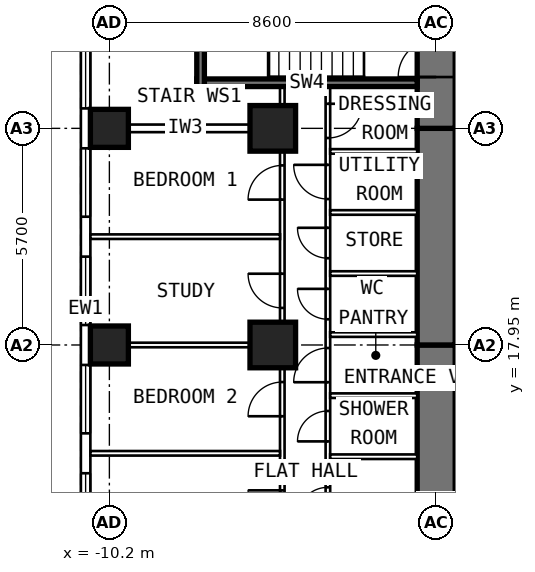
"""IFC4 building model, lengths in metres.
Left out: names, types, materials, properties, quantities, classifications, styles, units other than length and angle.
Written with IfcOpenShell. Run it as: python <this file> out.ifc"""

import sys

from ifc_helpers import new_model, si_unit, direction, frame, frame_2d, origin, origin_2d, place, context, subcontext, project, spatial, rectangle, extrude, element, fill, save


model = new_model("IFC4")
c1 = context("Model", 3, precision=1e-05, world=origin(), true_north=direction((0.0, 1.0)))
c2 = subcontext(c1, "Body", "Model", "MODEL_VIEW")
j1 = project(units=[si_unit("LENGTHUNIT", "METRE"), si_unit("PLANEANGLEUNIT", "RADIAN")], contexts=[c1])
p1 = place(None, origin())
s1 = spatial("IfcSite", under=j1, at=p1, CompositionType="ELEMENT")
p2 = place(p1, origin())
s2 = spatial("IfcBuilding", under=s1, at=p2, CompositionType="ELEMENT")
p3 = place(p2, frame((0.0, 0.0, 46.6)))
s3 = spatial("IfcBuildingStorey", under=s2, at=p3, CompositionType="ELEMENT", Elevation=46.6)
for number, where, z_axis, x_axis in (
    (1, (-10.2, 17.95, 0.0), (0.0, 0.0, 1.0), (0.0, 1.0, 0.0)),
    (2, (-10.2, 23.65, 0.0), (0.0, 0.0, 1.0), (0.0, 1.0, 0.0)),
):
    element("IfcColumn", number, at=place(p3, frame(where, z_axis=z_axis, x_axis=x_axis)), inside=s3, PredefinedType="COLUMN", context=c2, shape_type="SweptSolid", body=[
        extrude(rectangle(XDim=1.0, YDim=1.0, at=origin_2d()), origin(), (0.0, 0.0, 1.0), 3.6),
    ])
for number, where, z_axis, x_axis in (
    (3, (-5.9, 17.95, 0.0), (0.0, 0.0, 1.0), (0.0, 1.0, 0.0)),
    (4, (-5.9, 23.65, 0.0), (0.0, 0.0, 1.0), (0.0, 1.0, 0.0)),
):
    element("IfcColumn", number, at=place(p3, frame(where, z_axis=z_axis, x_axis=x_axis)), inside=s3, PredefinedType="COLUMN", context=c2, shape_type="SweptSolid", body=[
        extrude(rectangle(XDim=1.2, YDim=1.2, at=origin_2d()), origin(), (0.0, 0.0, 1.0), 3.6),
    ])
p4 = place(p3, frame((-1.6, 9.6, 0.0), z_axis=(0.0, 0.0, 1.0), x_axis=(0.0, 1.0, 0.0)))
e5 = element("IfcWall", 5, at=p4, inside=s3, PredefinedType="SHEAR", context=c2, shape_type="SweptSolid", body=[
    extrude(rectangle(XDim=8.35, YDim=1.0, at=frame_2d((4.175, 0.0))), origin(), (0.0, 0.0, 1.0), 3.6),
])
p5 = place(p4, frame((1.3, 0.0, 0.0)))
e6 = element("IfcOpeningElement", 6, at=p5, cuts=e5, PredefinedType="OPENING", context=c2, shape_type="SweptSolid", body=[
    extrude(rectangle(XDim=1.0, YDim=2.1, at=frame_2d((0.5, 1.05))), frame((0.0, 0.512, 0.0), z_axis=(0.0, -1.0, 0.0), x_axis=(1.0, 0.0, 0.0)), (0.0, 0.0, 1.0), 1.024),
])
p6 = place(p3, frame((-1.6, 17.95, 0.0), z_axis=(0.0, 0.0, 1.0), x_axis=(0.0, 1.0, 0.0)))
e7 = element("IfcWall", 7, at=p6, inside=s3, PredefinedType="SHEAR", context=c2, shape_type="SweptSolid", body=[
    extrude(rectangle(XDim=5.7, YDim=1.0, at=frame_2d((2.85, 0.0))), origin(), (0.0, 0.0, 1.0), 3.6),
])
p7 = place(p3, frame((-1.6, 23.65, 0.0), z_axis=(0.0, 0.0, 1.0), x_axis=(0.0, 1.0, 0.0)))
e8 = element("IfcWall", 8, at=p7, inside=s3, PredefinedType="SHEAR", context=c2, shape_type="SweptSolid", body=[
    extrude(rectangle(XDim=10.745, YDim=1.0, at=frame_2d((5.373, 0.0))), origin(), (0.0, 0.0, 1.0), 3.6),
])
p8 = place(p7, frame((6.1, 0.0, 0.0)))
e9 = element("IfcOpeningElement", 9, at=p8, cuts=e8, PredefinedType="OPENING", context=c2, shape_type="SweptSolid", body=[
    extrude(rectangle(XDim=1.0, YDim=2.1, at=frame_2d((0.5, 1.05))), frame((0.0, 0.512, 0.0), z_axis=(0.0, -1.0, 0.0), x_axis=(1.0, 0.0, 0.0)), (0.0, 0.0, 1.0), 1.024),
])
p9 = place(p7, frame((1.35, 0.0, 0.0)))
e10 = element("IfcOpeningElement", 10, at=p9, cuts=e8, PredefinedType="OPENING", context=c2, shape_type="SweptSolid", body=[
    extrude(rectangle(XDim=1.0, YDim=2.1, at=frame_2d((0.5, 1.05))), frame((0.0, 0.512, 0.0), z_axis=(0.0, -1.0, 0.0), x_axis=(1.0, 0.0, 0.0)), (0.0, 0.0, 1.0), 1.024),
])
p10 = place(p3, frame((-10.825, 6.148, 0.0), z_axis=(0.0, 0.0, 1.0), x_axis=(0.0, 1.0, 0.0)))
e11 = element("IfcWall", 11, at=p10, inside=s3, PredefinedType="SOLIDWALL", context=c2, shape_type="SweptSolid", body=[
    extrude(rectangle(XDim=25.487, YDim=0.25, at=frame_2d((12.744, 0.0))), origin(), (0.0, 0.0, 1.0), 3.35),
])
p11 = place(p10, frame((0.927, 0.0, 0.8)))
e12 = element("IfcOpeningElement", 12, at=p11, cuts=e11, PredefinedType="OPENING", context=c2, shape_type="SweptSolid", body=[
    extrude(rectangle(XDim=1.8, YDim=1.8, at=frame_2d((0.9, 0.9))), frame((0.0, 0.137, 0.0), z_axis=(0.0, -1.0, 0.0), x_axis=(1.0, 0.0, 0.0)), (0.0, 0.0, 1.0), 0.274),
])
p12 = place(p10, frame((3.777, 0.0, 0.8)))
e13 = element("IfcOpeningElement", 13, at=p12, cuts=e11, PredefinedType="OPENING", context=c2, shape_type="SweptSolid", body=[
    extrude(rectangle(XDim=1.8, YDim=1.8, at=frame_2d((0.9, 0.9))), frame((0.0, 0.137, 0.0), z_axis=(0.0, -1.0, 0.0), x_axis=(1.0, 0.0, 0.0)), (0.0, 0.0, 1.0), 0.274),
])
p13 = place(p10, frame((6.627, 0.0, 0.8)))
e14 = element("IfcOpeningElement", 14, at=p13, cuts=e11, PredefinedType="OPENING", context=c2, shape_type="SweptSolid", body=[
    extrude(rectangle(XDim=1.8, YDim=1.8, at=frame_2d((0.9, 0.9))), frame((0.0, 0.137, 0.0), z_axis=(0.0, -1.0, 0.0), x_axis=(1.0, 0.0, 0.0)), (0.0, 0.0, 1.0), 0.274),
])
p14 = place(p10, frame((9.477, 0.0, 0.8)))
e15 = element("IfcOpeningElement", 15, at=p14, cuts=e11, PredefinedType="OPENING", context=c2, shape_type="SweptSolid", body=[
    extrude(rectangle(XDim=1.8, YDim=1.8, at=frame_2d((0.9, 0.9))), frame((0.0, 0.137, 0.0), z_axis=(0.0, -1.0, 0.0), x_axis=(1.0, 0.0, 0.0)), (0.0, 0.0, 1.0), 0.274),
])
p15 = place(p10, frame((12.327, 0.0, 0.8)))
e16 = element("IfcOpeningElement", 16, at=p15, cuts=e11, PredefinedType="OPENING", context=c2, shape_type="SweptSolid", body=[
    extrude(rectangle(XDim=1.8, YDim=1.8, at=frame_2d((0.9, 0.9))), frame((0.0, 0.137, 0.0), z_axis=(0.0, -1.0, 0.0), x_axis=(1.0, 0.0, 0.0)), (0.0, 0.0, 1.0), 0.274),
])
p16 = place(p10, frame((15.177, 0.0, 0.8)))
e17 = element("IfcOpeningElement", 17, at=p16, cuts=e11, PredefinedType="OPENING", context=c2, shape_type="SweptSolid", body=[
    extrude(rectangle(XDim=1.8, YDim=1.8, at=frame_2d((0.9, 0.9))), frame((0.0, 0.137, 0.0), z_axis=(0.0, -1.0, 0.0), x_axis=(1.0, 0.0, 0.0)), (0.0, 0.0, 1.0), 0.274),
])
p17 = place(p10, frame((18.027, 0.0, 0.8)))
e18 = element("IfcOpeningElement", 18, at=p17, cuts=e11, PredefinedType="OPENING", context=c2, shape_type="SweptSolid", body=[
    extrude(rectangle(XDim=1.8, YDim=1.8, at=frame_2d((0.9, 0.9))), frame((0.0, 0.137, 0.0), z_axis=(0.0, -1.0, 0.0), x_axis=(1.0, 0.0, 0.0)), (0.0, 0.0, 1.0), 0.274),
])
p18 = place(p10, frame((20.877, 0.0, 0.8)))
e19 = element("IfcOpeningElement", 19, at=p18, cuts=e11, PredefinedType="OPENING", context=c2, shape_type="SweptSolid", body=[
    extrude(rectangle(XDim=1.8, YDim=1.8, at=frame_2d((0.9, 0.9))), frame((0.0, 0.137, 0.0), z_axis=(0.0, -1.0, 0.0), x_axis=(1.0, 0.0, 0.0)), (0.0, 0.0, 1.0), 0.274),
])
p19 = place(p3, frame((-4.45, 10.1, 0.0), z_axis=(0.0, 0.0, 1.0), x_axis=(0.0, 1.0, 0.0)))
e20 = element("IfcWall", 20, at=p19, inside=s3, PredefinedType="PARTITIONING", context=c2, shape_type="SweptSolid", body=[
    extrude(rectangle(XDim=14.65, YDim=0.12, at=frame_2d((7.325, 0.0))), origin(), (0.0, 0.0, 1.0), 3.35),
])
p20 = place(p19, frame((0.75, 0.0, 0.0)))
e21 = element("IfcOpeningElement", 21, at=p20, cuts=e20, PredefinedType="OPENING", context=c2, shape_type="SweptSolid", body=[
    extrude(rectangle(XDim=0.9, YDim=2.1, at=frame_2d((0.45, 1.05))), frame((0.0, 0.072, 0.0), z_axis=(0.0, -1.0, 0.0), x_axis=(1.0, 0.0, 0.0)), (0.0, 0.0, 1.0), 0.144),
])
p21 = place(p19, frame((3.305, 0.0, 0.0)))
e22 = element("IfcOpeningElement", 22, at=p21, cuts=e20, PredefinedType="OPENING", context=c2, shape_type="SweptSolid", body=[
    extrude(rectangle(XDim=0.8, YDim=2.1, at=frame_2d((0.4, 1.05))), frame((0.0, 0.072, 0.0), z_axis=(0.0, -1.0, 0.0), x_axis=(1.0, 0.0, 0.0)), (0.0, 0.0, 1.0), 0.144),
])
p22 = place(p19, frame((5.313, 0.0, 0.0)))
e23 = element("IfcOpeningElement", 23, at=p22, cuts=e20, PredefinedType="OPENING", context=c2, shape_type="SweptSolid", body=[
    extrude(rectangle(XDim=0.8, YDim=2.1, at=frame_2d((0.4, 1.05))), frame((0.0, 0.072, 0.0), z_axis=(0.0, -1.0, 0.0), x_axis=(1.0, 0.0, 0.0)), (0.0, 0.0, 1.0), 0.144),
])
p23 = place(p19, frame((6.87, 0.0, 0.0)))
e24 = element("IfcOpeningElement", 24, at=p23, cuts=e20, PredefinedType="OPENING", context=c2, shape_type="SweptSolid", body=[
    extrude(rectangle(XDim=0.9, YDim=2.1, at=frame_2d((0.45, 1.05))), frame((0.0, 0.072, 0.0), z_axis=(0.0, -1.0, 0.0), x_axis=(1.0, 0.0, 0.0)), (0.0, 0.0, 1.0), 0.144),
])
p24 = place(p19, frame((8.527, 0.0, 0.0)))
e25 = element("IfcOpeningElement", 25, at=p24, cuts=e20, PredefinedType="OPENING", context=c2, shape_type="SweptSolid", body=[
    extrude(rectangle(XDim=0.8, YDim=2.1, at=frame_2d((0.4, 1.05))), frame((0.0, 0.072, 0.0), z_axis=(0.0, -1.0, 0.0), x_axis=(1.0, 0.0, 0.0)), (0.0, 0.0, 1.0), 0.144),
])
p25 = place(p19, frame((10.133, 0.0, 0.0)))
e26 = element("IfcOpeningElement", 26, at=p25, cuts=e20, PredefinedType="OPENING", context=c2, shape_type="SweptSolid", body=[
    extrude(rectangle(XDim=0.8, YDim=2.1, at=frame_2d((0.4, 1.05))), frame((0.0, 0.072, 0.0), z_axis=(0.0, -1.0, 0.0), x_axis=(1.0, 0.0, 0.0)), (0.0, 0.0, 1.0), 0.144),
])
p26 = place(p19, frame((11.69, 0.0, 0.0)))
e27 = element("IfcOpeningElement", 27, at=p26, cuts=e20, PredefinedType="OPENING", context=c2, shape_type="SweptSolid", body=[
    extrude(rectangle(XDim=0.9, YDim=2.1, at=frame_2d((0.45, 1.05))), frame((0.0, 0.072, 0.0), z_axis=(0.0, -1.0, 0.0), x_axis=(1.0, 0.0, 0.0)), (0.0, 0.0, 1.0), 0.144),
])
p27 = place(p19, frame((13.297, 0.0, 0.0)))
e28 = element("IfcOpeningElement", 28, at=p27, cuts=e20, PredefinedType="OPENING", context=c2, shape_type="SweptSolid", body=[
    extrude(rectangle(XDim=0.9, YDim=2.1, at=frame_2d((0.45, 1.05))), frame((0.0, 0.072, 0.0), z_axis=(0.0, -1.0, 0.0), x_axis=(1.0, 0.0, 0.0)), (0.0, 0.0, 1.0), 0.144),
])
p28 = place(p3, frame((-5.65, 9.6, 0.0), z_axis=(0.0, 0.0, 1.0), x_axis=(0.0, 1.0, 0.0)))
e29 = element("IfcWall", 29, at=p28, inside=s3, PredefinedType="PARTITIONING", context=c2, shape_type="SweptSolid", body=[
    extrude(rectangle(XDim=15.15, YDim=0.12, at=frame_2d((7.575, 0.0))), origin(), (0.0, 0.0, 1.0), 3.35),
])
p29 = place(p28, frame((1.0, 0.0, 0.0)))
e30 = element("IfcOpeningElement", 30, at=p29, cuts=e29, PredefinedType="OPENING", context=c2, shape_type="SweptSolid", body=[
    extrude(rectangle(XDim=0.9, YDim=2.1, at=frame_2d((0.45, 1.05))), frame((0.0, 0.072, 0.0), z_axis=(0.0, -1.0, 0.0), x_axis=(1.0, 0.0, 0.0)), (0.0, 0.0, 1.0), 0.144),
])
p30 = place(p28, frame((3.625, 0.0, 0.0)))
e31 = element("IfcOpeningElement", 31, at=p30, cuts=e29, PredefinedType="OPENING", context=c2, shape_type="SweptSolid", body=[
    extrude(rectangle(XDim=0.9, YDim=2.1, at=frame_2d((0.45, 1.05))), frame((0.0, 0.072, 0.0), z_axis=(0.0, -1.0, 0.0), x_axis=(1.0, 0.0, 0.0)), (0.0, 0.0, 1.0), 0.144),
])
p31 = place(p28, frame((6.475, 0.0, 0.0)))
e32 = element("IfcOpeningElement", 32, at=p31, cuts=e29, PredefinedType="OPENING", context=c2, shape_type="SweptSolid", body=[
    extrude(rectangle(XDim=0.9, YDim=2.1, at=frame_2d((0.45, 1.05))), frame((0.0, 0.072, 0.0), z_axis=(0.0, -1.0, 0.0), x_axis=(1.0, 0.0, 0.0)), (0.0, 0.0, 1.0), 0.144),
])
p32 = place(p28, frame((9.325, 0.0, 0.0)))
e33 = element("IfcOpeningElement", 33, at=p32, cuts=e29, PredefinedType="OPENING", context=c2, shape_type="SweptSolid", body=[
    extrude(rectangle(XDim=0.9, YDim=2.1, at=frame_2d((0.45, 1.05))), frame((0.0, 0.072, 0.0), z_axis=(0.0, -1.0, 0.0), x_axis=(1.0, 0.0, 0.0)), (0.0, 0.0, 1.0), 0.144),
])
p33 = place(p28, frame((12.175, 0.0, 0.0)))
e34 = element("IfcOpeningElement", 34, at=p33, cuts=e29, PredefinedType="OPENING", context=c2, shape_type="SweptSolid", body=[
    extrude(rectangle(XDim=0.9, YDim=2.1, at=frame_2d((0.45, 1.05))), frame((0.0, 0.072, 0.0), z_axis=(0.0, -1.0, 0.0), x_axis=(1.0, 0.0, 0.0)), (0.0, 0.0, 1.0), 0.144),
])
p34 = place(p3, frame((-5.71, 15.1, 0.0), z_axis=(0.0, 0.0, 1.0), x_axis=(-1.0, 0.0, 0.0)))
e35 = element("IfcWall", 35, at=p34, inside=s3, PredefinedType="PARTITIONING", context=c2, shape_type="SweptSolid", body=[
    extrude(rectangle(XDim=4.99, YDim=0.12, at=frame_2d((2.495, 0.0))), origin(), (0.0, 0.0, 1.0), 3.35),
])
p35 = place(p3, frame((-5.71, 17.95, 0.0), z_axis=(0.0, 0.0, 1.0), x_axis=(-1.0, 0.0, 0.0)))
e36 = element("IfcWall", 36, at=p35, inside=s3, PredefinedType="PARTITIONING", context=c2, shape_type="SweptSolid", body=[
    extrude(rectangle(XDim=4.99, YDim=0.12, at=frame_2d((2.495, 0.0))), origin(), (0.0, 0.0, 1.0), 2.45),
])
p36 = place(p3, frame((-5.71, 20.8, 0.0), z_axis=(0.0, 0.0, 1.0), x_axis=(-1.0, 0.0, 0.0)))
e37 = element("IfcWall", 37, at=p36, inside=s3, PredefinedType="PARTITIONING", context=c2, shape_type="SweptSolid", body=[
    extrude(rectangle(XDim=4.99, YDim=0.12, at=frame_2d((2.495, 0.0))), origin(), (0.0, 0.0, 1.0), 3.35),
])
for number, where, z_axis, x_axis in (
    (38, (-2.1, 15.01, 0.0), (0.0, 0.0, 1.0), (-1.0, 0.0, 0.0)),
    (39, (-2.1, 16.617, 0.0), (0.0, 0.0, 1.0), (-1.0, 0.0, 0.0)),
):
    element("IfcWall", number, at=place(p3, frame(where, z_axis=z_axis, x_axis=x_axis)), inside=s3, PredefinedType="PARTITIONING", context=c2, shape_type="SweptSolid", body=[
        extrude(rectangle(XDim=2.29, YDim=0.12, at=frame_2d((1.145, 0.0))), origin(), (0.0, 0.0, 1.0), 3.35),
    ])
p37 = place(p3, frame((-2.1, 18.223, 0.0), z_axis=(0.0, 0.0, 1.0), x_axis=(-1.0, 0.0, 0.0)))
e40 = element("IfcWall", 40, at=p37, inside=s3, PredefinedType="PARTITIONING", context=c2, shape_type="SweptSolid", body=[
    extrude(rectangle(XDim=2.29, YDim=0.12, at=frame_2d((1.145, 0.0))), origin(), (0.0, 0.0, 1.0), 2.45),
])
for number, where, z_axis, x_axis in (
    (41, (-2.1, 19.83, 0.0), (0.0, 0.0, 1.0), (-1.0, 0.0, 0.0)),
    (42, (-2.1, 21.437, 0.0), (0.0, 0.0, 1.0), (-1.0, 0.0, 0.0)),
    (43, (-2.1, 23.043, 0.0), (0.0, 0.0, 1.0), (-1.0, 0.0, 0.0)),
):
    element("IfcWall", number, at=place(p3, frame(where, z_axis=z_axis, x_axis=x_axis)), inside=s3, PredefinedType="PARTITIONING", context=c2, shape_type="SweptSolid", body=[
        extrude(rectangle(XDim=2.29, YDim=0.12, at=frame_2d((1.145, 0.0))), origin(), (0.0, 0.0, 1.0), 3.35),
    ])
p38 = place(p3, frame((-5.71, 23.65, 0.0), z_axis=(0.0, 0.0, 1.0), x_axis=(-1.0, 0.0, 0.0)))
e44 = element("IfcWall", 44, at=p38, inside=s3, PredefinedType="PARTITIONING", context=c2, shape_type="SweptSolid", body=[
    extrude(rectangle(XDim=4.99, YDim=0.2, at=frame_2d((2.495, 0.0))), origin(), (0.0, 0.0, 1.0), 2.45),
])
p39 = place(p3, frame((-2.1, 24.85, 0.0), z_axis=(0.0, 0.0, 1.0), x_axis=(-1.0, 0.0, 0.0)))
e45 = element("IfcWall", 45, at=p39, inside=s3, PredefinedType="SHEAR", context=c2, shape_type="SweptSolid", body=[
    extrude(rectangle(XDim=5.8, YDim=0.2, at=frame_2d((2.9, 0.0))), origin(), (0.0, 0.0, 1.0), 3.33),
])
p40 = place(p3, frame((-7.8, 24.75, 0.0), z_axis=(0.0, 0.0, 1.0), x_axis=(0.0, 1.0, 0.0)))
e46 = element("IfcWall", 46, at=p40, inside=s3, PredefinedType="SHEAR", context=c2, shape_type="SweptSolid", body=[
    extrude(rectangle(XDim=4.0, YDim=0.2, at=frame_2d((2.0, 0.0))), origin(), (0.0, 0.0, 1.0), 3.33),
])
p41 = place(p13, origin())
e47 = element("IfcWindow", 47, at=p41, inside=s3, PartitioningType="SINGLE_PANEL", PredefinedType="WINDOW", context=c2, shape_type="SweptSolid", body=[
    extrude(rectangle(XDim=1.8, YDim=1.8, at=frame_2d((0.9, 0.9))), frame((0.0, 0.03, 0.0), z_axis=(0.0, -1.0, 0.0), x_axis=(1.0, 0.0, 0.0)), (0.0, 0.0, 1.0), 0.06),
])
fill(e14, e47)
p42 = place(p14, origin())
e48 = element("IfcWindow", 48, at=p42, inside=s3, PartitioningType="SINGLE_PANEL", PredefinedType="WINDOW", context=c2, shape_type="SweptSolid", body=[
    extrude(rectangle(XDim=1.8, YDim=1.8, at=frame_2d((0.9, 0.9))), frame((0.0, 0.03, 0.0), z_axis=(0.0, -1.0, 0.0), x_axis=(1.0, 0.0, 0.0)), (0.0, 0.0, 1.0), 0.06),
])
fill(e15, e48)
p43 = place(p15, origin())
e49 = element("IfcWindow", 49, at=p43, inside=s3, PartitioningType="SINGLE_PANEL", PredefinedType="WINDOW", context=c2, shape_type="SweptSolid", body=[
    extrude(rectangle(XDim=1.8, YDim=1.8, at=frame_2d((0.9, 0.9))), frame((0.0, 0.03, 0.0), z_axis=(0.0, -1.0, 0.0), x_axis=(1.0, 0.0, 0.0)), (0.0, 0.0, 1.0), 0.06),
])
fill(e16, e49)
p44 = place(p16, origin())
e50 = element("IfcWindow", 50, at=p44, inside=s3, PartitioningType="SINGLE_PANEL", PredefinedType="WINDOW", context=c2, shape_type="SweptSolid", body=[
    extrude(rectangle(XDim=1.8, YDim=1.8, at=frame_2d((0.9, 0.9))), frame((0.0, 0.03, 0.0), z_axis=(0.0, -1.0, 0.0), x_axis=(1.0, 0.0, 0.0)), (0.0, 0.0, 1.0), 0.06),
])
fill(e17, e50)
p45 = place(p17, origin())
e51 = element("IfcWindow", 51, at=p45, inside=s3, PartitioningType="SINGLE_PANEL", PredefinedType="WINDOW", context=c2, shape_type="SweptSolid", body=[
    extrude(rectangle(XDim=1.8, YDim=1.8, at=frame_2d((0.9, 0.9))), frame((0.0, 0.03, 0.0), z_axis=(0.0, -1.0, 0.0), x_axis=(1.0, 0.0, 0.0)), (0.0, 0.0, 1.0), 0.06),
])
fill(e18, e51)
p46 = place(p30, origin())
e52 = element("IfcDoor", 52, at=p46, inside=s3, OperationType="SINGLE_SWING_RIGHT", PredefinedType="DOOR", context=c2, shape_type="SweptSolid", body=[
    extrude(rectangle(XDim=0.9, YDim=2.1, at=frame_2d((0.45, 1.05))), frame((0.0, 0.025, 0.0), z_axis=(0.0, -1.0, 0.0), x_axis=(1.0, 0.0, 0.0)), (0.0, 0.0, 1.0), 0.05),
])
fill(e31, e52)
p47 = place(p31, origin())
e53 = element("IfcDoor", 53, at=p47, inside=s3, OperationType="SINGLE_SWING_LEFT", PredefinedType="DOOR", context=c2, shape_type="SweptSolid", body=[
    extrude(rectangle(XDim=0.9, YDim=2.1, at=frame_2d((0.45, 1.05))), frame((0.0, 0.025, 0.0), z_axis=(0.0, -1.0, 0.0), x_axis=(1.0, 0.0, 0.0)), (0.0, 0.0, 1.0), 0.05),
])
fill(e32, e53)
p48 = place(p32, origin())
e54 = element("IfcDoor", 54, at=p48, inside=s3, OperationType="SINGLE_SWING_RIGHT", PredefinedType="DOOR", context=c2, shape_type="SweptSolid", body=[
    extrude(rectangle(XDim=0.9, YDim=2.1, at=frame_2d((0.45, 1.05))), frame((0.0, 0.025, 0.0), z_axis=(0.0, -1.0, 0.0), x_axis=(1.0, 0.0, 0.0)), (0.0, 0.0, 1.0), 0.05),
])
fill(e33, e54)
p49 = place(p33, origin())
e55 = element("IfcDoor", 55, at=p49, inside=s3, OperationType="SINGLE_SWING_LEFT", PredefinedType="DOOR", context=c2, shape_type="SweptSolid", body=[
    extrude(rectangle(XDim=0.9, YDim=2.1, at=frame_2d((0.45, 1.05))), frame((0.0, 0.025, 0.0), z_axis=(0.0, -1.0, 0.0), x_axis=(1.0, 0.0, 0.0)), (0.0, 0.0, 1.0), 0.05),
])
fill(e34, e55)
p50 = place(p21, origin())
e56 = element("IfcDoor", 56, at=p50, inside=s3, OperationType="SINGLE_SWING_LEFT", PredefinedType="DOOR", context=c2, shape_type="SweptSolid", body=[
    extrude(rectangle(XDim=0.8, YDim=2.1, at=frame_2d((0.4, 1.05))), frame((0.0, 0.025, 0.0), z_axis=(0.0, -1.0, 0.0), x_axis=(1.0, 0.0, 0.0)), (0.0, 0.0, 1.0), 0.05),
])
fill(e22, e56)
p51 = place(p22, origin())
e57 = element("IfcDoor", 57, at=p51, inside=s3, OperationType="SINGLE_SWING_LEFT", PredefinedType="DOOR", context=c2, shape_type="SweptSolid", body=[
    extrude(rectangle(XDim=0.8, YDim=2.1, at=frame_2d((0.4, 1.05))), frame((0.0, 0.025, 0.0), z_axis=(0.0, -1.0, 0.0), x_axis=(1.0, 0.0, 0.0)), (0.0, 0.0, 1.0), 0.05),
])
fill(e23, e57)
p52 = place(p23, origin())
e58 = element("IfcDoor", 58, at=p52, inside=s3, OperationType="SINGLE_SWING_LEFT", PredefinedType="DOOR", context=c2, shape_type="SweptSolid", body=[
    extrude(rectangle(XDim=0.9, YDim=2.1, at=frame_2d((0.45, 1.05))), frame((0.0, 0.025, 0.0), z_axis=(0.0, -1.0, 0.0), x_axis=(1.0, 0.0, 0.0)), (0.0, 0.0, 1.0), 0.05),
])
fill(e24, e58)
p53 = place(p24, origin())
e59 = element("IfcDoor", 59, at=p53, inside=s3, OperationType="SINGLE_SWING_RIGHT", PredefinedType="DOOR", context=c2, shape_type="SweptSolid", body=[
    extrude(rectangle(XDim=0.8, YDim=2.1, at=frame_2d((0.4, 1.05))), frame((0.0, 0.025, 0.0), z_axis=(0.0, -1.0, 0.0), x_axis=(1.0, 0.0, 0.0)), (0.0, 0.0, 1.0), 0.05),
])
fill(e25, e59)
p54 = place(p25, origin())
e60 = element("IfcDoor", 60, at=p54, inside=s3, OperationType="SINGLE_SWING_RIGHT", PredefinedType="DOOR", context=c2, shape_type="SweptSolid", body=[
    extrude(rectangle(XDim=0.8, YDim=2.1, at=frame_2d((0.4, 1.05))), frame((0.0, 0.025, 0.0), z_axis=(0.0, -1.0, 0.0), x_axis=(1.0, 0.0, 0.0)), (0.0, 0.0, 1.0), 0.05),
])
fill(e26, e60)
p55 = place(p26, origin())
e61 = element("IfcDoor", 61, at=p55, inside=s3, OperationType="SINGLE_SWING_RIGHT", PredefinedType="DOOR", context=c2, shape_type="SweptSolid", body=[
    extrude(rectangle(XDim=0.9, YDim=2.1, at=frame_2d((0.45, 1.05))), frame((0.0, 0.025, 0.0), z_axis=(0.0, -1.0, 0.0), x_axis=(1.0, 0.0, 0.0)), (0.0, 0.0, 1.0), 0.05),
])
fill(e27, e61)
p56 = place(p27, frame((0.9, 0.0, 0.0), z_axis=(0.0, 0.0, 1.0), x_axis=(-1.0, 0.0, 0.0)))
e62 = element("IfcDoor", 62, at=p56, inside=s3, OperationType="SINGLE_SWING_LEFT", PredefinedType="DOOR", context=c2, shape_type="SweptSolid", body=[
    extrude(rectangle(XDim=0.9, YDim=2.1, at=frame_2d((0.45, 1.05))), frame((0.0, 0.025, 0.0), z_axis=(0.0, -1.0, 0.0), x_axis=(1.0, 0.0, 0.0)), (0.0, 0.0, 1.0), 0.05),
])
fill(e28, e62)
p57 = place(p9, origin())
e63 = element("IfcDoor", 63, at=p57, inside=s3, OperationType="SINGLE_SWING_LEFT", PredefinedType="DOOR", context=c2, shape_type="SweptSolid", body=[
    extrude(rectangle(XDim=1.0, YDim=2.1, at=frame_2d((0.5, 1.05))), frame((0.0, 0.25, 0.0), z_axis=(0.0, -1.0, 0.0), x_axis=(1.0, 0.0, 0.0)), (0.0, 0.0, 1.0), 0.5),
])
fill(e10, e63)
save(model, sys.argv[1])
